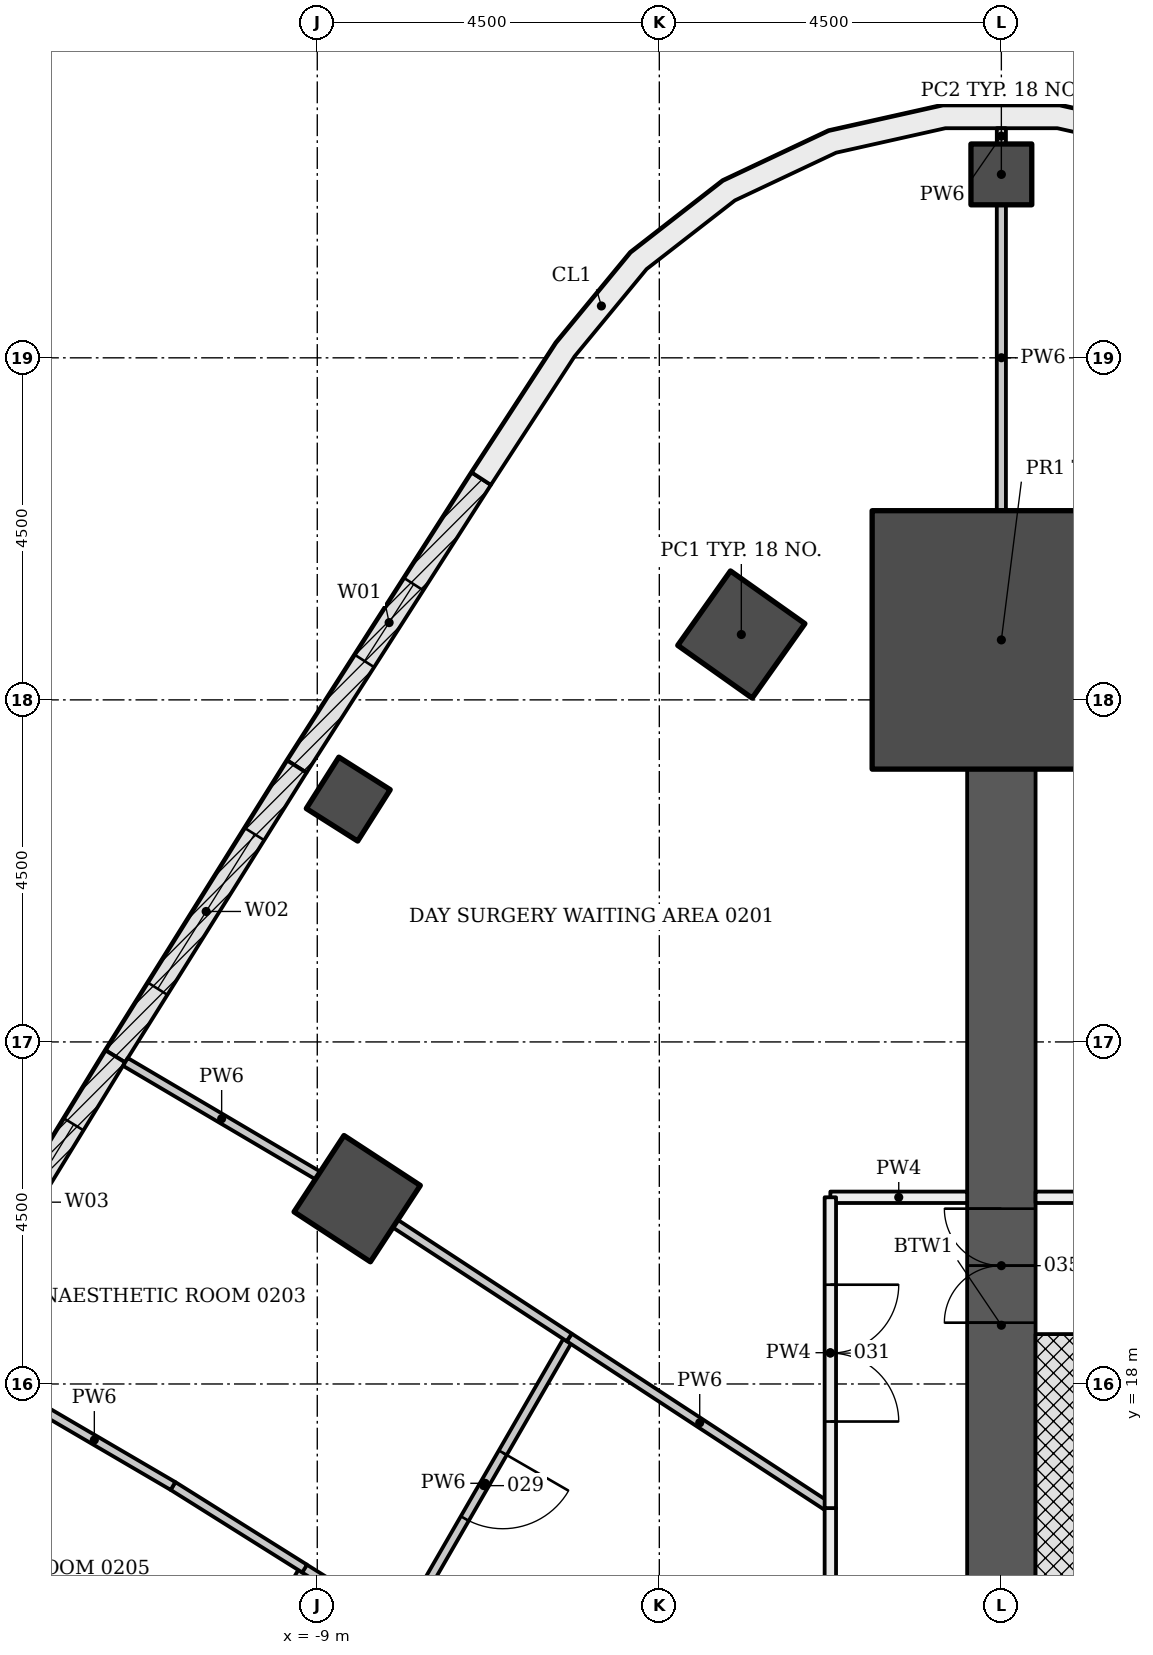
"""IFC4 building model, lengths in metres.
Left out: names, types, materials, properties, quantities, classifications, styles, units other than length and angle.
Written with IfcOpenShell. Run it as: python <this file> out.ifc"""

import sys

from ifc_helpers import new_model, si_unit, direction, frame, frame_2d, origin, origin_2d, place, context, subcontext, project, spatial, polyline, rectangle, outline, extrude, element, fill, save


model = new_model("IFC4")
c1 = context("Model", 3, precision=1e-05, world=origin(), true_north=direction((0.0, 1.0)))
c2 = subcontext(c1, "Body", "Model", "MODEL_VIEW")
j1 = project(units=[si_unit("LENGTHUNIT", "METRE"), si_unit("PLANEANGLEUNIT", "RADIAN")], contexts=[c1])
p1 = place(None, origin())
s1 = spatial("IfcSite", under=j1, at=p1, CompositionType="ELEMENT")
p2 = place(p1, origin())
s2 = spatial("IfcBuilding", under=s1, at=p2, CompositionType="ELEMENT")
p3 = place(p2, frame((0.0, 0.0, 10.5)))
s3 = spatial("IfcBuildingStorey", under=s2, at=p3, CompositionType="ELEMENT", Elevation=10.5)
for number, where, z_axis, x_axis in (
    (1, (-3.421, 27.86, -0.25), (0.0, 0.0, 1.0), (-0.816, 0.578, 0.0)),
    (2, (-8.475, 20.438, -0.25), (0.0, 0.0, 1.0), (-0.837, 0.547, 0.0)),
):
    element("IfcColumn", number, at=place(p3, frame(where, z_axis=z_axis, x_axis=x_axis)), inside=s3, PredefinedType="COLUMN", context=c2, shape_type="SweptSolid", body=[
        extrude(rectangle(XDim=1.2, YDim=1.2, at=origin_2d()), origin(), (0.0, 0.0, 1.0), 4.5),
    ])
for number, where, z_axis, x_axis in (
    (3, (0.0, 33.913, -0.25), (0.0, 0.0, 1.0), (0.0, 1.0, 0.0)),
    (4, (-8.592, 25.695, -0.25), (0.0, 0.0, 1.0), (-0.845, 0.535, 0.0)),
):
    element("IfcColumn", number, at=place(p3, frame(where, z_axis=z_axis, x_axis=x_axis)), inside=s3, PredefinedType="COLUMN", context=c2, shape_type="SweptSolid", body=[
        extrude(rectangle(XDim=0.8, YDim=0.8, at=origin_2d()), origin(), (0.0, 0.0, 1.0), 4.5),
    ])
p4 = place(p3, frame((0.0, 11.456, -0.25), z_axis=(0.0, 0.0, 1.0), x_axis=(0.0, 1.0, 0.0)))
e5 = element("IfcWall", 5, at=p4, inside=s3, PredefinedType="SHEAR", context=c2, shape_type="SweptSolid", body=[
    extrude(rectangle(XDim=14.633, YDim=0.9, at=frame_2d((7.316, 0.0))), origin(), (0.0, 0.0, 1.0), 4.5),
])
p5 = place(p4, frame((7.35, 0.0, 0.25)))
e6 = element("IfcOpeningElement", 6, at=p5, cuts=e5, PredefinedType="OPENING", context=c2, shape_type="SweptSolid", body=[
    extrude(rectangle(XDim=1.5, YDim=2.1, at=frame_2d((0.75, 1.05))), frame((0.0, 0.46, 0.0), z_axis=(0.0, -1.0, 0.0), x_axis=(1.0, 0.0, 0.0)), (0.0, 0.0, 1.0), 0.92),
])
p6 = place(p3, frame((0.0, 27.789, -0.25), z_axis=(0.0, 0.0, 1.0), x_axis=(0.0, 1.0, 0.0)))
e7 = element("IfcColumn", 7, at=p6, inside=s3, PredefinedType="COLUMN", context=c2, shape_type="SweptSolid", body=[
    extrude(rectangle(XDim=3.4, YDim=3.4, at=origin_2d()), origin(), (0.0, 0.0, 1.0), 4.5),
])
p7 = place(p3, frame((-9.268, 26.124, 0.0), z_axis=(0.0, 0.0, 1.0), x_axis=(0.539483537275, 0.841996147859, 0.0)))
e8 = element("IfcWall", 8, at=p7, inside=s3, PredefinedType="NOTDEFINED", context=c2, shape_type="SweptSolid", body=[
    extrude(rectangle(XDim=4.496, YDim=0.3, at=frame_2d((2.248, 0.0))), origin(), (0.0, 0.0, 1.0), 4.25),
])
p8 = place(p7, frame((1.648, 0.0, 0.8)))
e9 = element("IfcOpeningElement", 9, at=p8, cuts=e8, PredefinedType="OPENING", context=c2, shape_type="SweptSolid", body=[
    extrude(rectangle(XDim=1.2, YDim=3.0, at=frame_2d((0.6, 1.5))), frame((0.0, 0.16, 0.0), z_axis=(0.0, -1.0, 0.0), x_axis=(1.0, 0.0, 0.0)), (0.0, 0.0, 1.0), 0.32),
])
p9 = place(p3, frame((-11.655, 22.311, 0.0), z_axis=(0.0, 0.0, 1.0), x_axis=(0.530804082031, 0.847494558389, 0.0)))
e10 = element("IfcWall", 10, at=p9, inside=s3, PredefinedType="NOTDEFINED", context=c2, shape_type="SweptSolid", body=[
    extrude(rectangle(XDim=4.496, YDim=0.3, at=frame_2d((2.248, 0.0))), origin(), (0.0, 0.0, 1.0), 4.25),
])
p10 = place(p9, frame((1.048, 0.0, 0.9)))
e11 = element("IfcOpeningElement", 11, at=p10, cuts=e10, PredefinedType="OPENING", context=c2, shape_type="SweptSolid", body=[
    extrude(rectangle(XDim=2.4, YDim=2.4, at=frame_2d((1.2, 1.2))), frame((0.0, 0.16, 0.0), z_axis=(0.0, -1.0, 0.0), x_axis=(1.0, 0.0, 0.0)), (0.0, 0.0, 1.0), 0.32),
])
p11 = place(p3, frame((-14.004, 18.475, 0.0), z_axis=(0.0, 0.0, 1.0), x_axis=(0.522078085402, 0.852897691838, 0.0)))
e12 = element("IfcWall", 12, at=p11, inside=s3, PredefinedType="NOTDEFINED", context=c2, shape_type="SweptSolid", body=[
    extrude(rectangle(XDim=4.496, YDim=0.3, at=frame_2d((2.248, 0.0))), origin(), (0.0, 0.0, 1.0), 4.25),
])
p12 = place(p11, frame((1.048, 0.0, 0.9)))
e13 = element("IfcOpeningElement", 13, at=p12, cuts=e12, PredefinedType="OPENING", context=c2, shape_type="SweptSolid", body=[
    extrude(rectangle(XDim=2.4, YDim=2.4, at=frame_2d((1.2, 1.2))), frame((0.0, 0.16, 0.0), z_axis=(0.0, -1.0, 0.0), x_axis=(1.0, 0.0, 0.0)), (0.0, 0.0, 1.0), 0.32),
])
p13 = place(p3, origin())
e14 = element("IfcWall", 14, at=p13, inside=s3, PredefinedType="NOTDEFINED", context=c2, shape_type="SweptSolid", body=[
    extrude(outline(polyline([(6.967, 29.992), (5.857, 31.697), (4.878, 32.884), (3.663, 33.828), (2.271, 34.485), (0.769, 34.821), (-0.769, 34.821), (-2.271, 34.485), (-3.663, 33.828), (-4.878, 32.884), (-5.857, 31.697), (-6.967, 29.992), (-6.716, 29.828), (-5.615, 31.519), (-4.667, 32.667), (-3.505, 33.571), (-2.173, 34.199), (-0.736, 34.521), (0.736, 34.521), (2.173, 34.199), (3.505, 33.571), (4.667, 32.667), (5.615, 31.519), (6.716, 29.828), (6.967, 29.992)])), origin(), (0.0, 0.0, 1.0), 4.25),
])
p14 = place(p3, frame((1.018, 11.456, -0.25), z_axis=(0.0, 0.0, 1.0), x_axis=(0.0, 1.0, 0.0)))
e15 = element("IfcWall", 15, at=p14, inside=s3, PredefinedType="SHEAR", context=c2, shape_type="SweptSolid", body=[
    extrude(rectangle(XDim=7.2, YDim=1.136, at=frame_2d((3.6, 0.0))), origin(), (0.0, 0.0, 1.0), 4.5),
])
p15 = place(p3, frame((7.136, 20.456, 0.0), z_axis=(0.0, 0.0, 1.0), x_axis=(-1.0, 0.0, 0.0)))
e16 = element("IfcWall", 16, at=p15, inside=s3, PredefinedType="PARTITIONING", context=c2, shape_type="SweptSolid", body=[
    extrude(rectangle(XDim=6.686, YDim=0.15, at=frame_2d((3.343, 0.0))), origin(), (0.0, 0.0, 1.0), 3.638),
])
p16 = place(p15, frame((2.45, 0.0, 0.0)))
e17 = element("IfcOpeningElement", 17, at=p16, cuts=e16, PredefinedType="OPENING", context=c2, shape_type="SweptSolid", body=[
    extrude(rectangle(XDim=1.8, YDim=2.1, at=frame_2d((0.9, 1.05))), frame((0.0, 0.085, 0.0), z_axis=(0.0, -1.0, 0.0), x_axis=(1.0, 0.0, 0.0)), (0.0, 0.0, 1.0), 0.17),
])
p17 = place(p3, frame((-9.17, 15.572, 0.0), z_axis=(0.0, 0.0, 1.0), x_axis=(-0.499902881486, -0.866081467924, 0.0)))
e18 = element("IfcWall", 18, at=p17, inside=s3, PredefinedType="PARTITIONING", context=c2, shape_type="SweptSolid", body=[
    extrude(rectangle(XDim=4.451, YDim=0.12, at=frame_2d((2.226, 0.0))), origin(), (0.0, 0.0, 1.0), 3.638),
])
p18 = place(p17, frame((1.75, 0.0, 0.0)))
e19 = element("IfcOpeningElement", 19, at=p18, cuts=e18, PredefinedType="OPENING", context=c2, shape_type="SweptSolid", body=[
    extrude(rectangle(XDim=1.0, YDim=2.1, at=frame_2d((0.5, 1.05))), frame((0.0, 0.07, 0.0), z_axis=(0.0, -1.0, 0.0), x_axis=(1.0, 0.0, 0.0)), (0.0, 0.0, 1.0), 0.14),
])
p19 = place(p3, frame((-7.901, 14.776, 0.0), z_axis=(0.0, 0.0, 1.0), x_axis=(-0.847002237732, 0.531589323892, 0.0)))
e20 = element("IfcWall", 20, at=p19, inside=s3, PredefinedType="PARTITIONING", context=c2, shape_type="SweptSolid", body=[
    extrude(rectangle(XDim=1.503, YDim=0.12, at=frame_2d((0.751, 0.0))), origin(), (0.0, 0.0, 1.0), 3.638),
])
p20 = place(p3, frame((-2.25, 16.367, 0.0), z_axis=(0.0, 0.0, 1.0), x_axis=(0.0, -1.0, 0.0)))
e21 = element("IfcWall", 21, at=p20, inside=s3, PredefinedType="PARTITIONING", context=c2, shape_type="SweptSolid", body=[
    extrude(rectangle(XDim=1.411, YDim=0.15, at=frame_2d((0.706, 0.0))), origin(), (0.0, 0.0, 1.0), 3.638),
])
p21 = place(p3, frame((-0.45, 20.456, 0.0), z_axis=(0.0, 0.0, 1.0), x_axis=(-1.0, 0.0, 0.0)))
e22 = element("IfcWall", 22, at=p21, inside=s3, PredefinedType="PARTITIONING", context=c2, shape_type="SweptSolid", body=[
    extrude(rectangle(XDim=1.8, YDim=0.15, at=frame_2d((0.9, 0.0))), origin(), (0.0, 0.0, 1.0), 3.638),
])
p22 = place(p3, frame((-2.25, 20.456, 0.0), z_axis=(0.0, 0.0, 1.0), x_axis=(0.0, -1.0, 0.0)))
e23 = element("IfcWall", 23, at=p22, inside=s3, PredefinedType="PARTITIONING", context=c2, shape_type="SweptSolid", body=[
    extrude(rectangle(XDim=4.089, YDim=0.15, at=frame_2d((2.044, 0.0))), origin(), (0.0, 0.0, 1.0), 3.638),
])
p23 = place(p22, frame((1.15, 0.0, 0.0)))
e24 = element("IfcOpeningElement", 24, at=p23, cuts=e23, PredefinedType="OPENING", context=c2, shape_type="SweptSolid", body=[
    extrude(rectangle(XDim=1.8, YDim=2.1, at=frame_2d((0.9, 1.05))), frame((0.0, 0.085, 0.0), z_axis=(0.0, -1.0, 0.0), x_axis=(1.0, 0.0, 0.0)), (0.0, 0.0, 1.0), 0.17),
])
p24 = place(p3, frame((-9.166, 15.571, 0.0), z_axis=(0.0, 0.0, 1.0), x_axis=(-0.84701751501, 0.531564981227, 0.0)))
e25 = element("IfcWall", 25, at=p24, inside=s3, PredefinedType="PARTITIONING", context=c2, shape_type="SweptSolid", body=[
    extrude(rectangle(XDim=2.045, YDim=0.12, at=frame_2d((1.022, 0.0))), origin(), (0.0, 0.0, 1.0), 3.638),
])
p25 = place(p3, frame((-10.898, 16.658, 0.0), z_axis=(0.0, 0.0, 1.0), x_axis=(-0.863161652457, 0.504927679701, 0.0)))
e26 = element("IfcWall", 26, at=p25, inside=s3, PredefinedType="PARTITIONING", context=c2, shape_type="SweptSolid", body=[
    extrude(rectangle(XDim=2.398, YDim=0.12, at=frame_2d((1.199, 0.0))), origin(), (0.0, 0.0, 1.0), 3.638),
])
p26 = place(p3, frame((-5.684, 18.611, 0.0), z_axis=(0.0, 0.0, 1.0), x_axis=(-0.500099413844, -0.865967999567, 0.0)))
e27 = element("IfcWall", 27, at=p26, inside=s3, PredefinedType="PARTITIONING", context=c2, shape_type="SweptSolid", body=[
    extrude(rectangle(XDim=4.429, YDim=0.12, at=frame_2d((2.214, 0.0))), origin(), (0.0, 0.0, 1.0), 3.638),
])
p27 = place(p26, frame((1.75, 0.0, 0.0)))
e28 = element("IfcOpeningElement", 28, at=p27, cuts=e27, PredefinedType="OPENING", context=c2, shape_type="SweptSolid", body=[
    extrude(rectangle(XDim=1.0, YDim=2.1, at=frame_2d((0.5, 1.05))), frame((0.0, 0.07, 0.0), z_axis=(0.0, -1.0, 0.0), x_axis=(1.0, 0.0, 0.0)), (0.0, 0.0, 1.0), 0.14),
])
p28 = place(p3, frame((-2.252, 16.367, 0.0), z_axis=(0.0, 0.0, 1.0), x_axis=(-0.836925574982, 0.547316710819, 0.0)))
e29 = element("IfcWall", 29, at=p28, inside=s3, PredefinedType="PARTITIONING", context=c2, shape_type="SweptSolid", body=[
    extrude(rectangle(XDim=4.102, YDim=0.12, at=frame_2d((2.051, 0.0))), origin(), (0.0, 0.0, 1.0), 3.638),
])
p29 = place(p3, frame((-8.992, 20.743, 0.0), z_axis=(0.0, 0.0, 1.0), x_axis=(-0.861228913487, 0.508217235613, 0.0)))
e30 = element("IfcWall", 30, at=p29, inside=s3, PredefinedType="PARTITIONING", context=c2, shape_type="SweptSolid", body=[
    extrude(rectangle(XDim=2.94, YDim=0.12, at=frame_2d((1.47, 0.0))), origin(), (0.0, 0.0, 1.0), 3.633),
])
p30 = place(p3, frame((-5.685, 18.612, 0.0), z_axis=(0.0, 0.0, 1.0), x_axis=(-0.836813840242, 0.547487531163, 0.0)))
e31 = element("IfcWall", 31, at=p30, inside=s3, PredefinedType="PARTITIONING", context=c2, shape_type="SweptSolid", body=[
    extrude(rectangle(XDim=2.734, YDim=0.12, at=frame_2d((1.367, 0.0))), origin(), (0.0, 0.0, 1.0), 3.638),
])
p31 = place(p3, frame((0.0, 29.489, 0.0), z_axis=(0.0, 0.0, 1.0), x_axis=(0.0, 1.0, 0.0)))
e32 = element("IfcWall", 32, at=p31, inside=s3, PredefinedType="PARTITIONING", context=c2, shape_type="SweptSolid", body=[
    extrude(rectangle(XDim=4.024, YDim=0.12, at=frame_2d((2.012, 0.0))), origin(), (0.0, 0.0, 1.0), 3.717),
])
p32 = place(p3, frame((0.0, 34.313, 0.0), z_axis=(0.0, 0.0, 1.0), x_axis=(0.0, 1.0, 0.0)))
e33 = element("IfcWall", 33, at=p32, inside=s3, PredefinedType="PARTITIONING", context=c2, shape_type="SweptSolid", body=[
    extrude(rectangle(XDim=0.208, YDim=0.12, at=frame_2d((0.104, 0.0))), origin(), (0.0, 0.0, 1.0), 4.25),
])
p33 = place(p8, origin())
e34 = element("IfcWindow", 34, at=p33, inside=s3, PartitioningType="SINGLE_PANEL", PredefinedType="WINDOW", context=c2, shape_type="SweptSolid", body=[
    extrude(rectangle(XDim=1.2, YDim=3.0, at=frame_2d((0.6, 1.5))), frame((0.0, 0.03, 0.0), z_axis=(0.0, -1.0, 0.0), x_axis=(1.0, 0.0, 0.0)), (0.0, 0.0, 1.0), 0.06),
])
fill(e9, e34)
p34 = place(p10, origin())
e35 = element("IfcWindow", 35, at=p34, inside=s3, PartitioningType="DOUBLE_PANEL_VERTICAL", PredefinedType="WINDOW", context=c2, shape_type="SweptSolid", body=[
    extrude(rectangle(XDim=2.4, YDim=2.4, at=frame_2d((1.2, 1.2))), frame((0.0, 0.03, 0.0), z_axis=(0.0, -1.0, 0.0), x_axis=(1.0, 0.0, 0.0)), (0.0, 0.0, 1.0), 0.06),
])
fill(e11, e35)
p35 = place(p12, origin())
e36 = element("IfcWindow", 36, at=p35, inside=s3, PartitioningType="DOUBLE_PANEL_VERTICAL", PredefinedType="WINDOW", context=c2, shape_type="SweptSolid", body=[
    extrude(rectangle(XDim=2.4, YDim=2.4, at=frame_2d((1.2, 1.2))), frame((0.0, 0.03, 0.0), z_axis=(0.0, -1.0, 0.0), x_axis=(1.0, 0.0, 0.0)), (0.0, 0.0, 1.0), 0.06),
])
fill(e13, e36)
p36 = place(p27, origin())
e37 = element("IfcDoor", 37, at=p36, inside=s3, OperationType="SINGLE_SWING_LEFT", PredefinedType="DOOR", context=c2, shape_type="SweptSolid", body=[
    extrude(rectangle(XDim=1.0, YDim=2.1, at=frame_2d((0.5, 1.05))), frame((0.0, 0.025, 0.0), z_axis=(0.0, -1.0, 0.0), x_axis=(1.0, 0.0, 0.0)), (0.0, 0.0, 1.0), 0.05),
])
fill(e28, e37)
p37 = place(p23, origin())
e38 = element("IfcDoor", 38, at=p37, inside=s3, OperationType="DOUBLE_DOOR_SINGLE_SWING", PredefinedType="DOOR", context=c2, shape_type="SweptSolid", body=[
    extrude(rectangle(XDim=1.8, YDim=2.1, at=frame_2d((0.9, 1.05))), frame((0.0, 0.025, 0.0), z_axis=(0.0, -1.0, 0.0), x_axis=(1.0, 0.0, 0.0)), (0.0, 0.0, 1.0), 0.05),
])
fill(e24, e38)
p38 = place(p5, origin())
e39 = element("IfcDoor", 39, at=p38, inside=s3, OperationType="DOUBLE_DOOR_SINGLE_SWING", PredefinedType="DOOR", context=c2, shape_type="SweptSolid", body=[
    extrude(rectangle(XDim=1.5, YDim=2.1, at=frame_2d((0.75, 1.05))), frame((0.0, 0.025, 0.0), z_axis=(0.0, -1.0, 0.0), x_axis=(1.0, 0.0, 0.0)), (0.0, 0.0, 1.0), 0.05),
])
fill(e6, e39)
save(model, sys.argv[1])
